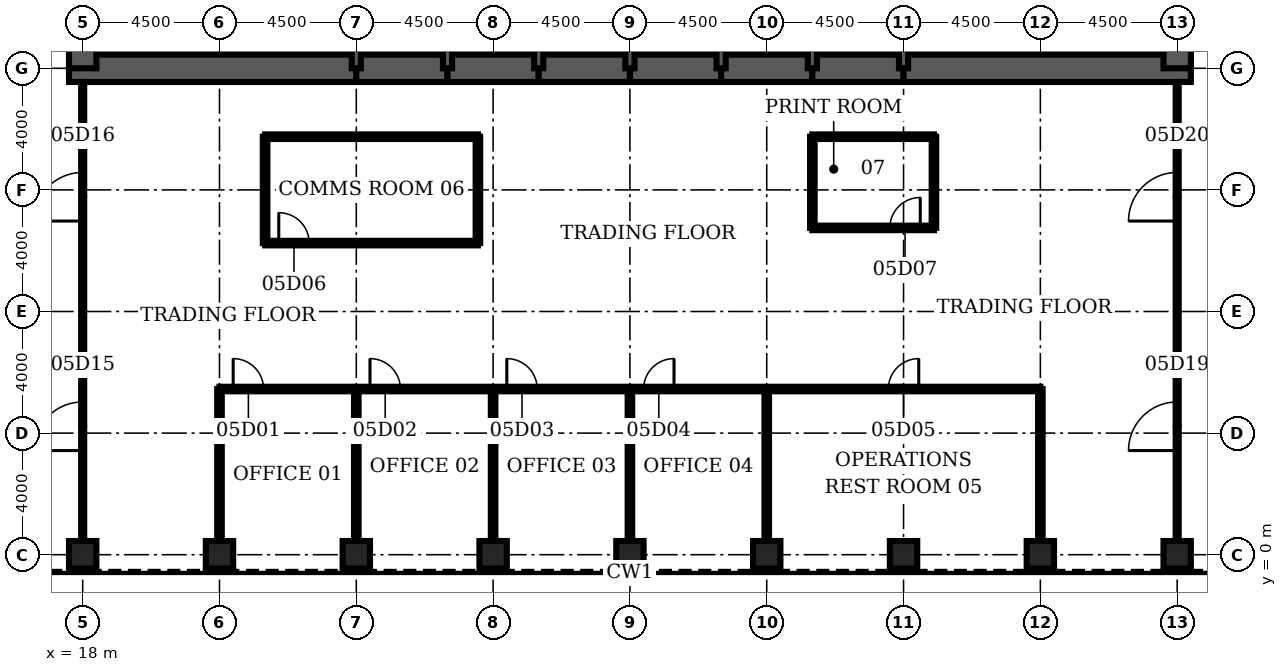
"""IFC4 building model, lengths in metres.
Left out: names, types, materials, properties, quantities, classifications, styles, units other than length and angle.
Written with IfcOpenShell. Run it as: python <this file> out.ifc"""

import sys

from ifc_helpers import new_model, si_unit, direction, frame, frame_2d, origin, origin_2d, place, context, subcontext, project, spatial, rectangle, hollow_rectangle, extrude, element, fill, save


model = new_model("IFC4")
c1 = context("Model", 3, precision=1e-05, world=origin(), true_north=direction((0.0, 1.0)))
c2 = subcontext(c1, "Body", "Model", "MODEL_VIEW")
j1 = project(units=[si_unit("LENGTHUNIT", "METRE"), si_unit("PLANEANGLEUNIT", "RADIAN")], contexts=[c1])
p1 = place(None, origin())
s1 = spatial("IfcSite", under=j1, at=p1, CompositionType="ELEMENT")
p2 = place(p1, origin())
s2 = spatial("IfcBuilding", under=s1, at=p2, CompositionType="ELEMENT")
p3 = place(p2, frame((0.0, 0.0, 27.5)))
s3 = spatial("IfcBuildingStorey", under=s2, at=p3, CompositionType="ELEMENT", Elevation=27.5)
for number, where, z_axis, x_axis in (
    (1, (18.0, 0.0, 0.0), (0.0, 0.0, 1.0), (0.0, 1.0, 0.0)),
    (2, (22.5, 0.0, 0.0), (0.0, 0.0, 1.0), (0.0, 1.0, 0.0)),
    (3, (27.0, 0.0, 0.0), (0.0, 0.0, 1.0), (0.0, 1.0, 0.0)),
    (4, (31.5, 0.0, 0.0), (0.0, 0.0, 1.0), (0.0, 1.0, 0.0)),
    (5, (36.0, 0.0, 0.0), (0.0, 0.0, 1.0), (0.0, 1.0, 0.0)),
    (6, (40.5, 0.0, 0.0), (0.0, 0.0, 1.0), (0.0, 1.0, 0.0)),
    (7, (45.0, 0.0, 0.0), (0.0, 0.0, 1.0), (0.0, 1.0, 0.0)),
    (8, (49.5, 0.0, 0.0), (0.0, 0.0, 1.0), (0.0, 1.0, 0.0)),
    (9, (54.0, 0.0, 0.0), (0.0, 0.0, 1.0), (0.0, 1.0, 0.0)),
):
    element("IfcColumn", number, at=place(p3, frame(where, z_axis=z_axis, x_axis=x_axis)), inside=s3, PredefinedType="COLUMN", context=c2, shape_type="SweptSolid", body=[
        extrude(hollow_rectangle(XDim=0.9, YDim=0.9, WallThickness=0.12, at=origin_2d()), origin(), (0.0, 0.0, 1.0), 4.5),
    ])
p4 = place(p3, frame((17.55, 16.0, 0.0), z_axis=(0.0, 0.0, 1.0), x_axis=(1.0, 0.0, 0.0)))
e10 = element("IfcWall", 10, at=p4, inside=s3, PredefinedType="SHEAR", context=c2, shape_type="SweptSolid", body=[
    extrude(rectangle(XDim=9.45, YDim=0.9, at=frame_2d((4.725, 0.0))), origin(), (0.0, 0.0, 1.0), 4.5),
])
for number, where, z_axis, x_axis in (
    (11, (27.0, 16.0, 0.0), (0.0, 0.0, 1.0), (1.0, 0.0, 0.0)),
    (12, (30.0, 16.0, 0.0), (0.0, 0.0, 1.0), (1.0, 0.0, 0.0)),
    (13, (33.0, 16.0, 0.0), (0.0, 0.0, 1.0), (1.0, 0.0, 0.0)),
    (14, (36.0, 16.0, 0.0), (0.0, 0.0, 1.0), (1.0, 0.0, 0.0)),
    (15, (39.0, 16.0, 0.0), (0.0, 0.0, 1.0), (1.0, 0.0, 0.0)),
    (16, (42.0, 16.0, 0.0), (0.0, 0.0, 1.0), (1.0, 0.0, 0.0)),
):
    element("IfcWall", number, at=place(p3, frame(where, z_axis=z_axis, x_axis=x_axis)), inside=s3, PredefinedType="SHEAR", context=c2, shape_type="SweptSolid", body=[
        extrude(rectangle(XDim=3.0, YDim=0.9, at=frame_2d((1.5, 0.0))), origin(), (0.0, 0.0, 1.0), 4.5),
    ])
p5 = place(p3, frame((45.0, 16.0, 0.0), z_axis=(0.0, 0.0, 1.0), x_axis=(1.0, 0.0, 0.0)))
e17 = element("IfcWall", 17, at=p5, inside=s3, PredefinedType="SHEAR", context=c2, shape_type="SweptSolid", body=[
    extrude(rectangle(XDim=9.45, YDim=0.9, at=frame_2d((4.725, 0.0))), origin(), (0.0, 0.0, 1.0), 4.5),
])
for number, where, z_axis, x_axis in (
    (18, (18.0, 19.2, 0.0), (0.0, 0.0, 1.0), (0.0, -1.0, 0.0)),
    (19, (54.0, 16.0, 0.0), (0.0, 0.0, 1.0), (0.0, 1.0, 0.0)),
):
    element("IfcWall", number, at=place(p3, frame(where, z_axis=z_axis, x_axis=x_axis)), inside=s3, PredefinedType="SHEAR", context=c2, shape_type="SweptSolid", body=[
        extrude(rectangle(XDim=3.2, YDim=0.9, at=frame_2d((1.6, 0.0))), origin(), (0.0, 0.0, 1.0), 4.5),
    ])
for number, where, z_axis, x_axis in (
    (20, (27.0, 16.0, 0.0), (0.0, 0.0, 1.0), (0.0, 1.0, 0.0)),
    (21, (30.0, 16.0, 0.0), (0.0, 0.0, 1.0), (0.0, 1.0, 0.0)),
    (22, (33.0, 16.0, 0.0), (0.0, 0.0, 1.0), (0.0, 1.0, 0.0)),
    (23, (36.0, 16.0, 0.0), (0.0, 0.0, 1.0), (0.0, 1.0, 0.0)),
    (24, (39.0, 16.0, 0.0), (0.0, 0.0, 1.0), (0.0, 1.0, 0.0)),
    (25, (42.0, 16.0, 0.0), (0.0, 0.0, 1.0), (0.0, 1.0, 0.0)),
    (26, (45.0, 16.0, 0.0), (0.0, 0.0, 1.0), (0.0, 1.0, 0.0)),
):
    element("IfcWall", number, at=place(p3, frame(where, z_axis=z_axis, x_axis=x_axis)), inside=s3, PredefinedType="SOLIDWALL", context=c2, shape_type="SweptSolid", body=[
        extrude(rectangle(XDim=3.2, YDim=0.3, at=frame_2d((1.6, 0.0))), origin(), (0.0, 0.0, 1.0), 4.5),
    ])
p6 = place(p3, frame((22.5, 5.45, 0.0), z_axis=(0.0, 0.0, 1.0), x_axis=(1.0, 0.0, 0.0)))
e27 = element("IfcWall", 27, at=p6, inside=s3, PredefinedType="PARTITIONING", context=c2, shape_type="SweptSolid", body=[
    extrude(rectangle(XDim=27.0, YDim=0.15, at=frame_2d((13.5, 0.0))), origin(), (0.0, 0.0, 1.0), 3.0),
])
p7 = place(p6, frame((0.45, 0.0, 0.0)))
e28 = element("IfcOpeningElement", 28, at=p7, cuts=e27, PredefinedType="OPENING", context=c2, shape_type="SweptSolid", body=[
    extrude(rectangle(XDim=1.0, YDim=2.1, at=frame_2d((0.5, 1.05))), frame((0.0, 0.085, 0.0), z_axis=(0.0, -1.0, 0.0), x_axis=(1.0, 0.0, 0.0)), (0.0, 0.0, 1.0), 0.17),
])
p8 = place(p6, frame((4.95, 0.0, 0.0)))
e29 = element("IfcOpeningElement", 29, at=p8, cuts=e27, PredefinedType="OPENING", context=c2, shape_type="SweptSolid", body=[
    extrude(rectangle(XDim=1.0, YDim=2.1, at=frame_2d((0.5, 1.05))), frame((0.0, 0.085, 0.0), z_axis=(0.0, -1.0, 0.0), x_axis=(1.0, 0.0, 0.0)), (0.0, 0.0, 1.0), 0.17),
])
p9 = place(p6, frame((9.45, 0.0, 0.0)))
e30 = element("IfcOpeningElement", 30, at=p9, cuts=e27, PredefinedType="OPENING", context=c2, shape_type="SweptSolid", body=[
    extrude(rectangle(XDim=1.0, YDim=2.1, at=frame_2d((0.5, 1.05))), frame((0.0, 0.085, 0.0), z_axis=(0.0, -1.0, 0.0), x_axis=(1.0, 0.0, 0.0)), (0.0, 0.0, 1.0), 0.17),
])
p10 = place(p6, frame((13.95, 0.0, 0.0)))
e31 = element("IfcOpeningElement", 31, at=p10, cuts=e27, PredefinedType="OPENING", context=c2, shape_type="SweptSolid", body=[
    extrude(rectangle(XDim=1.0, YDim=2.1, at=frame_2d((0.5, 1.05))), frame((0.0, 0.085, 0.0), z_axis=(0.0, -1.0, 0.0), x_axis=(1.0, 0.0, 0.0)), (0.0, 0.0, 1.0), 0.17),
])
p11 = place(p6, frame((22.0, 0.0, 0.0)))
e32 = element("IfcOpeningElement", 32, at=p11, cuts=e27, PredefinedType="OPENING", context=c2, shape_type="SweptSolid", body=[
    extrude(rectangle(XDim=1.0, YDim=2.1, at=frame_2d((0.5, 1.05))), frame((0.0, 0.085, 0.0), z_axis=(0.0, -1.0, 0.0), x_axis=(1.0, 0.0, 0.0)), (0.0, 0.0, 1.0), 0.17),
])
p12 = place(p3, frame((24.0, 10.25, 0.0), z_axis=(0.0, 0.0, 1.0), x_axis=(1.0, 0.0, 0.0)))
e33 = element("IfcWall", 33, at=p12, inside=s3, PredefinedType="PARTITIONING", context=c2, shape_type="SweptSolid", body=[
    extrude(rectangle(XDim=7.0, YDim=0.15, at=frame_2d((3.5, 0.0))), origin(), (0.0, 0.0, 1.0), 3.0),
])
p13 = place(p12, frame((0.45, 0.0, 0.0)))
e34 = element("IfcOpeningElement", 34, at=p13, cuts=e33, PredefinedType="OPENING", context=c2, shape_type="SweptSolid", body=[
    extrude(rectangle(XDim=1.0, YDim=2.1, at=frame_2d((0.5, 1.05))), frame((0.0, 0.085, 0.0), z_axis=(0.0, -1.0, 0.0), x_axis=(1.0, 0.0, 0.0)), (0.0, 0.0, 1.0), 0.17),
])
p14 = place(p3, frame((42.0, 10.75, 0.0), z_axis=(0.0, 0.0, 1.0), x_axis=(1.0, 0.0, 0.0)))
e35 = element("IfcWall", 35, at=p14, inside=s3, PredefinedType="PARTITIONING", context=c2, shape_type="SweptSolid", body=[
    extrude(rectangle(XDim=4.0, YDim=0.15, at=frame_2d((2.0, 0.0))), origin(), (0.0, 0.0, 1.0), 3.0),
])
p15 = place(p14, frame((2.55, 0.0, 0.0)))
e36 = element("IfcOpeningElement", 36, at=p15, cuts=e35, PredefinedType="OPENING", context=c2, shape_type="SweptSolid", body=[
    extrude(rectangle(XDim=1.0, YDim=2.1, at=frame_2d((0.5, 1.05))), frame((0.0, 0.085, 0.0), z_axis=(0.0, -1.0, 0.0), x_axis=(1.0, 0.0, 0.0)), (0.0, 0.0, 1.0), 0.17),
])
p16 = place(p3, frame((24.0, 13.75, 0.0), z_axis=(0.0, 0.0, 1.0), x_axis=(1.0, 0.0, 0.0)))
e37 = element("IfcWall", 37, at=p16, inside=s3, PredefinedType="PARTITIONING", context=c2, shape_type="SweptSolid", body=[
    extrude(rectangle(XDim=7.0, YDim=0.15, at=frame_2d((3.5, 0.0))), origin(), (0.0, 0.0, 1.0), 3.0),
])
p17 = place(p3, frame((42.0, 13.75, 0.0), z_axis=(0.0, 0.0, 1.0), x_axis=(1.0, 0.0, 0.0)))
e38 = element("IfcWall", 38, at=p17, inside=s3, PredefinedType="PARTITIONING", context=c2, shape_type="SweptSolid", body=[
    extrude(rectangle(XDim=4.0, YDim=0.15, at=frame_2d((2.0, 0.0))), origin(), (0.0, 0.0, 1.0), 3.0),
])
p18 = place(p3, frame((18.0, 0.45, 0.0), z_axis=(0.0, 0.0, 1.0), x_axis=(0.0, 1.0, 0.0)))
e39 = element("IfcWall", 39, at=p18, inside=s3, PredefinedType="PARTITIONING", context=c2, shape_type="SweptSolid", body=[
    extrude(rectangle(XDim=15.1, YDim=0.1, at=frame_2d((7.55, 0.0))), origin(), (0.0, 0.0, 1.0), 3.0),
])
p19 = place(p18, frame((2.975, 0.0, 0.0)))
e40 = element("IfcOpeningElement", 40, at=p19, cuts=e39, PredefinedType="OPENING", context=c2, shape_type="SweptSolid", body=[
    extrude(rectangle(XDim=1.6, YDim=2.1, at=frame_2d((0.8, 1.05))), frame((0.0, 0.06, 0.0), z_axis=(0.0, -1.0, 0.0), x_axis=(1.0, 0.0, 0.0)), (0.0, 0.0, 1.0), 0.12),
])
p20 = place(p18, frame((10.525, 0.0, 0.0)))
e41 = element("IfcOpeningElement", 41, at=p20, cuts=e39, PredefinedType="OPENING", context=c2, shape_type="SweptSolid", body=[
    extrude(rectangle(XDim=1.6, YDim=2.1, at=frame_2d((0.8, 1.05))), frame((0.0, 0.06, 0.0), z_axis=(0.0, -1.0, 0.0), x_axis=(1.0, 0.0, 0.0)), (0.0, 0.0, 1.0), 0.12),
])
p21 = place(p3, frame((22.5, 0.45, 0.0), z_axis=(0.0, 0.0, 1.0), x_axis=(0.0, 1.0, 0.0)))
e42 = element("IfcWall", 42, at=p21, inside=s3, PredefinedType="PARTITIONING", context=c2, shape_type="SweptSolid", body=[
    extrude(rectangle(XDim=5.0, YDim=0.15, at=frame_2d((2.5, 0.0))), origin(), (0.0, 0.0, 1.0), 3.0),
])
p22 = place(p3, frame((24.0, 10.25, 0.0), z_axis=(0.0, 0.0, 1.0), x_axis=(0.0, 1.0, 0.0)))
e43 = element("IfcWall", 43, at=p22, inside=s3, PredefinedType="PARTITIONING", context=c2, shape_type="SweptSolid", body=[
    extrude(rectangle(XDim=3.5, YDim=0.15, at=frame_2d((1.75, 0.0))), origin(), (0.0, 0.0, 1.0), 3.0),
])
p23 = place(p3, frame((27.0, 0.45, 0.0), z_axis=(0.0, 0.0, 1.0), x_axis=(0.0, 1.0, 0.0)))
e44 = element("IfcWall", 44, at=p23, inside=s3, PredefinedType="PARTITIONING", context=c2, shape_type="SweptSolid", body=[
    extrude(rectangle(XDim=5.0, YDim=0.15, at=frame_2d((2.5, 0.0))), origin(), (0.0, 0.0, 1.0), 3.0),
])
p24 = place(p3, frame((31.0, 10.25, 0.0), z_axis=(0.0, 0.0, 1.0), x_axis=(0.0, 1.0, 0.0)))
e45 = element("IfcWall", 45, at=p24, inside=s3, PredefinedType="PARTITIONING", context=c2, shape_type="SweptSolid", body=[
    extrude(rectangle(XDim=3.5, YDim=0.15, at=frame_2d((1.75, 0.0))), origin(), (0.0, 0.0, 1.0), 3.0),
])
for number, where, z_axis, x_axis in (
    (46, (31.5, 0.45, 0.0), (0.0, 0.0, 1.0), (0.0, 1.0, 0.0)),
    (47, (36.0, 0.45, 0.0), (0.0, 0.0, 1.0), (0.0, 1.0, 0.0)),
    (48, (40.5, 0.45, 0.0), (0.0, 0.0, 1.0), (0.0, 1.0, 0.0)),
):
    element("IfcWall", number, at=place(p3, frame(where, z_axis=z_axis, x_axis=x_axis)), inside=s3, PredefinedType="PARTITIONING", context=c2, shape_type="SweptSolid", body=[
        extrude(rectangle(XDim=5.0, YDim=0.15, at=frame_2d((2.5, 0.0))), origin(), (0.0, 0.0, 1.0), 3.0),
    ])
for number, where, z_axis, x_axis in (
    (49, (42.0, 10.75, 0.0), (0.0, 0.0, 1.0), (0.0, 1.0, 0.0)),
    (50, (46.0, 10.75, 0.0), (0.0, 0.0, 1.0), (0.0, 1.0, 0.0)),
):
    element("IfcWall", number, at=place(p3, frame(where, z_axis=z_axis, x_axis=x_axis)), inside=s3, PredefinedType="PARTITIONING", context=c2, shape_type="SweptSolid", body=[
        extrude(rectangle(XDim=3.0, YDim=0.15, at=frame_2d((1.5, 0.0))), origin(), (0.0, 0.0, 1.0), 3.0),
    ])
p25 = place(p3, frame((49.5, 0.45, 0.0), z_axis=(0.0, 0.0, 1.0), x_axis=(0.0, 1.0, 0.0)))
e51 = element("IfcWall", 51, at=p25, inside=s3, PredefinedType="PARTITIONING", context=c2, shape_type="SweptSolid", body=[
    extrude(rectangle(XDim=5.0, YDim=0.15, at=frame_2d((2.5, 0.0))), origin(), (0.0, 0.0, 1.0), 3.0),
])
p26 = place(p3, frame((54.0, 0.45, 0.0), z_axis=(0.0, 0.0, 1.0), x_axis=(0.0, 1.0, 0.0)))
e52 = element("IfcWall", 52, at=p26, inside=s3, PredefinedType="PARTITIONING", context=c2, shape_type="SweptSolid", body=[
    extrude(rectangle(XDim=15.1, YDim=0.1, at=frame_2d((7.55, 0.0))), origin(), (0.0, 0.0, 1.0), 3.0),
])
p27 = place(p26, frame((2.975, 0.0, 0.0)))
e53 = element("IfcOpeningElement", 53, at=p27, cuts=e52, PredefinedType="OPENING", context=c2, shape_type="SweptSolid", body=[
    extrude(rectangle(XDim=1.6, YDim=2.1, at=frame_2d((0.8, 1.05))), frame((0.0, 0.06, 0.0), z_axis=(0.0, -1.0, 0.0), x_axis=(1.0, 0.0, 0.0)), (0.0, 0.0, 1.0), 0.12),
])
p28 = place(p26, frame((10.525, 0.0, 0.0)))
e54 = element("IfcOpeningElement", 54, at=p28, cuts=e52, PredefinedType="OPENING", context=c2, shape_type="SweptSolid", body=[
    extrude(rectangle(XDim=1.6, YDim=2.1, at=frame_2d((0.8, 1.05))), frame((0.0, 0.06, 0.0), z_axis=(0.0, -1.0, 0.0), x_axis=(1.0, 0.0, 0.0)), (0.0, 0.0, 1.0), 0.12),
])
p29 = place(p7, origin())
e55 = element("IfcDoor", 55, at=p29, inside=s3, OperationType="SINGLE_SWING_LEFT", PredefinedType="DOOR", context=c2, shape_type="SweptSolid", body=[
    extrude(rectangle(XDim=1.0, YDim=2.1, at=frame_2d((0.5, 1.05))), frame((0.0, 0.025, 0.0), z_axis=(0.0, -1.0, 0.0), x_axis=(1.0, 0.0, 0.0)), (0.0, 0.0, 1.0), 0.05),
])
fill(e28, e55)
p30 = place(p8, origin())
e56 = element("IfcDoor", 56, at=p30, inside=s3, OperationType="SINGLE_SWING_LEFT", PredefinedType="DOOR", context=c2, shape_type="SweptSolid", body=[
    extrude(rectangle(XDim=1.0, YDim=2.1, at=frame_2d((0.5, 1.05))), frame((0.0, 0.025, 0.0), z_axis=(0.0, -1.0, 0.0), x_axis=(1.0, 0.0, 0.0)), (0.0, 0.0, 1.0), 0.05),
])
fill(e29, e56)
p31 = place(p9, origin())
e57 = element("IfcDoor", 57, at=p31, inside=s3, OperationType="SINGLE_SWING_LEFT", PredefinedType="DOOR", context=c2, shape_type="SweptSolid", body=[
    extrude(rectangle(XDim=1.0, YDim=2.1, at=frame_2d((0.5, 1.05))), frame((0.0, 0.025, 0.0), z_axis=(0.0, -1.0, 0.0), x_axis=(1.0, 0.0, 0.0)), (0.0, 0.0, 1.0), 0.05),
])
fill(e30, e57)
p32 = place(p10, origin())
e58 = element("IfcDoor", 58, at=p32, inside=s3, OperationType="SINGLE_SWING_RIGHT", PredefinedType="DOOR", context=c2, shape_type="SweptSolid", body=[
    extrude(rectangle(XDim=1.0, YDim=2.1, at=frame_2d((0.5, 1.05))), frame((0.0, 0.025, 0.0), z_axis=(0.0, -1.0, 0.0), x_axis=(1.0, 0.0, 0.0)), (0.0, 0.0, 1.0), 0.05),
])
fill(e31, e58)
p33 = place(p11, origin())
e59 = element("IfcDoor", 59, at=p33, inside=s3, OperationType="SINGLE_SWING_RIGHT", PredefinedType="DOOR", context=c2, shape_type="SweptSolid", body=[
    extrude(rectangle(XDim=1.0, YDim=2.1, at=frame_2d((0.5, 1.05))), frame((0.0, 0.025, 0.0), z_axis=(0.0, -1.0, 0.0), x_axis=(1.0, 0.0, 0.0)), (0.0, 0.0, 1.0), 0.05),
])
fill(e32, e59)
p34 = place(p13, origin())
e60 = element("IfcDoor", 60, at=p34, inside=s3, OperationType="SINGLE_SWING_LEFT", PredefinedType="DOOR", context=c2, shape_type="SweptSolid", body=[
    extrude(rectangle(XDim=1.0, YDim=2.1, at=frame_2d((0.5, 1.05))), frame((0.0, 0.025, 0.0), z_axis=(0.0, -1.0, 0.0), x_axis=(1.0, 0.0, 0.0)), (0.0, 0.0, 1.0), 0.05),
])
fill(e34, e60)
p35 = place(p15, origin())
e61 = element("IfcDoor", 61, at=p35, inside=s3, OperationType="SINGLE_SWING_RIGHT", PredefinedType="DOOR", context=c2, shape_type="SweptSolid", body=[
    extrude(rectangle(XDim=1.0, YDim=2.1, at=frame_2d((0.5, 1.05))), frame((0.0, 0.025, 0.0), z_axis=(0.0, -1.0, 0.0), x_axis=(1.0, 0.0, 0.0)), (0.0, 0.0, 1.0), 0.05),
])
fill(e36, e61)
p36 = place(p19, origin())
e62 = element("IfcDoor", 62, at=p36, inside=s3, OperationType="SINGLE_SWING_LEFT", PredefinedType="DOOR", context=c2, shape_type="SweptSolid", body=[
    extrude(rectangle(XDim=1.6, YDim=2.1, at=frame_2d((0.8, 1.05))), frame((0.0, 0.025, 0.0), z_axis=(0.0, -1.0, 0.0), x_axis=(1.0, 0.0, 0.0)), (0.0, 0.0, 1.0), 0.05),
])
fill(e40, e62)
p37 = place(p20, origin())
e63 = element("IfcDoor", 63, at=p37, inside=s3, OperationType="SINGLE_SWING_LEFT", PredefinedType="DOOR", context=c2, shape_type="SweptSolid", body=[
    extrude(rectangle(XDim=1.6, YDim=2.1, at=frame_2d((0.8, 1.05))), frame((0.0, 0.025, 0.0), z_axis=(0.0, -1.0, 0.0), x_axis=(1.0, 0.0, 0.0)), (0.0, 0.0, 1.0), 0.05),
])
fill(e41, e63)
p38 = place(p27, origin())
e64 = element("IfcDoor", 64, at=p38, inside=s3, OperationType="SINGLE_SWING_LEFT", PredefinedType="DOOR", context=c2, shape_type="SweptSolid", body=[
    extrude(rectangle(XDim=1.6, YDim=2.1, at=frame_2d((0.8, 1.05))), frame((0.0, 0.025, 0.0), z_axis=(0.0, -1.0, 0.0), x_axis=(1.0, 0.0, 0.0)), (0.0, 0.0, 1.0), 0.05),
])
fill(e53, e64)
p39 = place(p28, origin())
e65 = element("IfcDoor", 65, at=p39, inside=s3, OperationType="SINGLE_SWING_LEFT", PredefinedType="DOOR", context=c2, shape_type="SweptSolid", body=[
    extrude(rectangle(XDim=1.6, YDim=2.1, at=frame_2d((0.8, 1.05))), frame((0.0, 0.025, 0.0), z_axis=(0.0, -1.0, 0.0), x_axis=(1.0, 0.0, 0.0)), (0.0, 0.0, 1.0), 0.05),
])
fill(e54, e65)
save(model, sys.argv[1])
